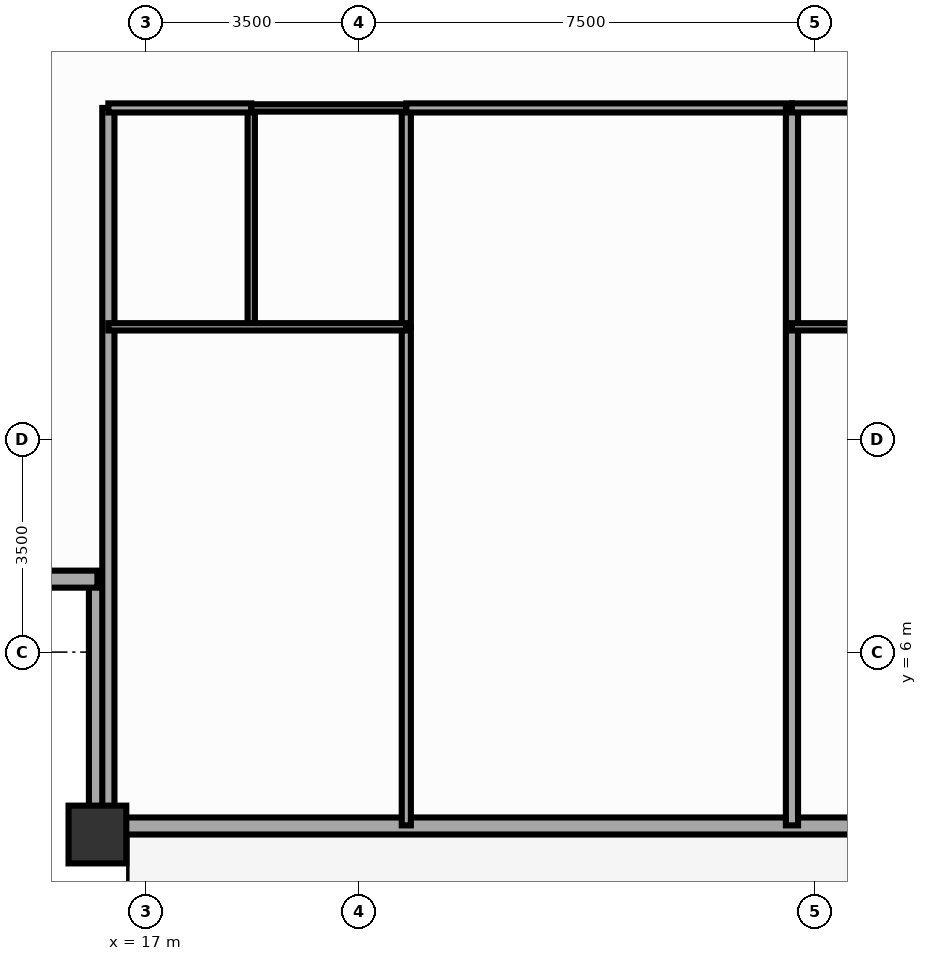
"""IFC4 building model, lengths in metres.
Left out: names, types, materials, properties, quantities, classifications, styles, units other than length and angle.
Written with IfcOpenShell. Run it as: python <this file> out.ifc"""

import sys

from ifc_helpers import new_model, si_unit, direction, frame, frame_2d, origin, origin_2d, place, context, subcontext, project, spatial, rectangle, extrude, source, transform, mapped, element, fill, save


model = new_model("IFC4")
c1 = context("Model", 3, precision=1e-05, world=origin(), true_north=direction((0.0, 1.0)))
c2 = subcontext(c1, "Body", "Model", "MODEL_VIEW")
j1 = project(units=[si_unit("LENGTHUNIT", "METRE"), si_unit("PLANEANGLEUNIT", "RADIAN")], contexts=[c1])
p1 = place(None, origin())
s1 = spatial("IfcSite", under=j1, at=p1, CompositionType="ELEMENT")
p2 = place(p1, origin())
s2 = spatial("IfcBuilding", under=s1, at=p2, CompositionType="ELEMENT")
p3 = place(p2, frame((0.0, 0.0, 74.35)))
s3 = spatial("IfcBuildingStorey", under=s2, at=p3, CompositionType="ELEMENT", Elevation=74.35)
m1 = source(origin(), c2, "Body", "SweptSolid", [
    extrude(rectangle(XDim=0.95, YDim=0.95, at=origin_2d()), origin(), (0.0, 0.0, 1.0), 3.5),
])
p4 = place(p3, frame((16.2, 3.0, 0.0), z_axis=(0.0, 0.0, 1.0), x_axis=(1.0, 0.0, 0.0)))
e1 = element("IfcColumn", 1, at=p4, inside=s3, PredefinedType="COLUMN", context=c2, shape_type="MappedRepresentation", body=[
    mapped(m1, transform((0.0, 0.0, 0.0), scale=1.0)),
])
p5 = place(p3, frame((16.2, 3.14, 0.0), z_axis=(0.0, 0.0, 1.0), x_axis=(1.0, 0.0, 0.0)))
e2 = element("IfcWall", 2, at=p5, inside=s3, PredefinedType="SOLIDWALL", context=c2, shape_type="SweptSolid", body=[
    extrude(rectangle(XDim=43.6, YDim=0.28, at=frame_2d((21.8, 0.0))), origin(), (0.0, 0.0, 1.0), 2.78),
])
p6 = place(p5, frame((1.798, 0.0, 0.85)))
e3 = element("IfcOpeningElement", 3, at=p6, cuts=e2, PredefinedType="OPENING", context=c2, shape_type="SweptSolid", body=[
    extrude(rectangle(XDim=1.8, YDim=1.65, at=frame_2d((0.9, 0.825))), frame((0.0, 0.152, 0.0), z_axis=(0.0, -1.0, 0.0), x_axis=(1.0, 0.0, 0.0)), (0.0, 0.0, 1.0), 0.304),
])
p7 = place(p5, frame((7.351, 0.0, 0.85)))
e4 = element("IfcOpeningElement", 4, at=p7, cuts=e2, PredefinedType="OPENING", context=c2, shape_type="SweptSolid", body=[
    extrude(rectangle(XDim=1.8, YDim=1.65, at=frame_2d((0.9, 0.825))), frame((0.0, 0.152, 0.0), z_axis=(0.0, -1.0, 0.0), x_axis=(1.0, 0.0, 0.0)), (0.0, 0.0, 1.0), 0.304),
])
p8 = place(p5, frame((12.304, 0.0, 0.85)))
e5 = element("IfcOpeningElement", 5, at=p8, cuts=e2, PredefinedType="OPENING", context=c2, shape_type="SweptSolid", body=[
    extrude(rectangle(XDim=1.8, YDim=1.65, at=frame_2d((0.9, 0.825))), frame((0.0, 0.152, 0.0), z_axis=(0.0, -1.0, 0.0), x_axis=(1.0, 0.0, 0.0)), (0.0, 0.0, 1.0), 0.304),
])
p9 = place(p5, frame((20.044, 0.0, 0.0), z_axis=(0.0, 0.0, 1.0), x_axis=(-1.0, 0.0, 0.0)))
e6 = element("IfcOpeningElement", 6, at=p9, cuts=e2, PredefinedType="OPENING", context=c2, shape_type="SweptSolid", body=[
    extrude(rectangle(XDim=1.1, YDim=2.15, at=frame_2d((0.55, 1.075))), frame((0.0, 0.152, 0.0), z_axis=(0.0, -1.0, 0.0), x_axis=(1.0, 0.0, 0.0)), (0.0, 0.0, 1.0), 0.304),
])
p10 = place(p5, frame((24.215, 0.0, 0.85)))
e7 = element("IfcOpeningElement", 7, at=p10, cuts=e2, PredefinedType="OPENING", context=c2, shape_type="SweptSolid", body=[
    extrude(rectangle(XDim=1.8, YDim=1.65, at=frame_2d((0.9, 0.825))), frame((0.0, 0.152, 0.0), z_axis=(0.0, -1.0, 0.0), x_axis=(1.0, 0.0, 0.0)), (0.0, 0.0, 1.0), 0.304),
])
p11 = place(p5, frame((29.929, 0.0, 0.85)))
e8 = element("IfcOpeningElement", 8, at=p11, cuts=e2, PredefinedType="OPENING", context=c2, shape_type="SweptSolid", body=[
    extrude(rectangle(XDim=1.8, YDim=1.65, at=frame_2d((0.9, 0.825))), frame((0.0, 0.152, 0.0), z_axis=(0.0, -1.0, 0.0), x_axis=(1.0, 0.0, 0.0)), (0.0, 0.0, 1.0), 0.304),
])
p12 = place(p5, frame((34.592, 0.0, 0.85)))
e9 = element("IfcOpeningElement", 9, at=p12, cuts=e2, PredefinedType="OPENING", context=c2, shape_type="SweptSolid", body=[
    extrude(rectangle(XDim=1.8, YDim=1.65, at=frame_2d((0.9, 0.825))), frame((0.0, 0.152, 0.0), z_axis=(0.0, -1.0, 0.0), x_axis=(1.0, 0.0, 0.0)), (0.0, 0.0, 1.0), 0.304),
])
p13 = place(p5, frame((39.714, 0.0, 0.85)))
e10 = element("IfcOpeningElement", 10, at=p13, cuts=e2, PredefinedType="OPENING", context=c2, shape_type="SweptSolid", body=[
    extrude(rectangle(XDim=1.8, YDim=1.65, at=frame_2d((0.9, 0.825))), frame((0.0, 0.152, 0.0), z_axis=(0.0, -1.0, 0.0), x_axis=(1.0, 0.0, 0.0)), (0.0, 0.0, 1.0), 0.304),
])
for number, where, z_axis, x_axis in (
    (11, (16.2, 3.08, 0.0), (0.0, 0.0, 1.0), (0.0, 1.0, 0.0)),
    (12, (12.08, 7.2, 0.0), (0.0, 0.0, 1.0), (1.0, 0.0, 0.0)),
):
    element("IfcWall", number, at=place(p3, frame(where, z_axis=z_axis, x_axis=x_axis)), inside=s3, PredefinedType="SOLIDWALL", context=c2, shape_type="SweptSolid", body=[
        extrude(rectangle(XDim=4.12, YDim=0.28, at=frame_2d((2.06, 0.0))), origin(), (0.0, 0.0, 1.0), 2.78),
    ])
p14 = place(p3, frame((16.38, 14.95, 0.0), z_axis=(0.0, 0.0, 1.0), x_axis=(0.0, -1.0, 0.0)))
e13 = element("IfcWall", 13, at=p14, inside=s3, PredefinedType="PARTITIONING", context=c2, shape_type="SweptSolid", body=[
    extrude(rectangle(XDim=11.8, YDim=0.2, at=frame_2d((5.9, 0.0))), origin(), (0.0, 0.0, 1.0), 3.29),
])
p15 = place(p3, frame((18.73, 14.95, 0.0), z_axis=(0.0, 0.0, 1.0), x_axis=(0.0, -1.0, 0.0)))
e14 = element("IfcWall", 14, at=p15, inside=s3, PredefinedType="PARTITIONING", context=c2, shape_type="SweptSolid", body=[
    extrude(rectangle(XDim=3.6, YDim=0.12, at=frame_2d((1.8, 0.0))), origin(), (0.0, 0.0, 1.0), 3.29),
])
p16 = place(p3, frame((21.28, 14.95, 0.0), z_axis=(0.0, 0.0, 1.0), x_axis=(0.0, -1.0, 0.0)))
e15 = element("IfcWall", 15, at=p16, inside=s3, PredefinedType="PARTITIONING", context=c2, shape_type="SweptSolid", body=[
    extrude(rectangle(XDim=3.6, YDim=0.15, at=frame_2d((1.8, 0.0))), origin(), (0.0, 0.0, 1.0), 3.29),
])
p17 = place(p3, frame((21.28, 11.35, 0.0), z_axis=(0.0, 0.0, 1.0), x_axis=(0.0, -1.0, 0.0)))
e16 = element("IfcWall", 16, at=p17, inside=s3, PredefinedType="PARTITIONING", context=c2, shape_type="SweptSolid", body=[
    extrude(rectangle(XDim=8.2, YDim=0.15, at=frame_2d((4.1, 0.0))), origin(), (0.0, 0.0, 1.0), 3.29),
])
p18 = place(p17, frame((3.65, 0.0, 0.0)))
e17 = element("IfcOpeningElement", 17, at=p18, cuts=e16, PredefinedType="OPENING", context=c2, shape_type="SweptSolid", body=[
    extrude(rectangle(XDim=0.9, YDim=2.1, at=frame_2d((0.45, 1.05))), frame((0.0, 0.087, 0.0), z_axis=(0.0, -1.0, 0.0), x_axis=(1.0, 0.0, 0.0)), (0.0, 0.0, 1.0), 0.174),
])
p19 = place(p3, frame((16.38, 11.35, 0.0), z_axis=(0.0, 0.0, 1.0), x_axis=(1.0, 0.0, 0.0)))
e18 = element("IfcWall", 18, at=p19, inside=s3, PredefinedType="PARTITIONING", context=c2, shape_type="SweptSolid", body=[
    extrude(rectangle(XDim=4.9, YDim=0.12, at=frame_2d((2.45, 0.0))), origin(), (0.0, 0.0, 1.0), 3.29),
])
p20 = place(p3, frame((16.38, 14.95, 0.0), z_axis=(0.0, 0.0, 1.0), x_axis=(1.0, 0.0, 0.0)))
e19 = element("IfcWall", 19, at=p20, inside=s3, PredefinedType="PARTITIONING", context=c2, shape_type="SweptSolid", body=[
    extrude(rectangle(XDim=2.35, YDim=0.15, at=frame_2d((1.175, 0.0))), origin(), (0.0, 0.0, 1.0), 3.29),
])
p21 = place(p20, frame((0.725, 0.0, 0.0)))
e20 = element("IfcOpeningElement", 20, at=p21, cuts=e19, PredefinedType="OPENING", context=c2, shape_type="SweptSolid", body=[
    extrude(rectangle(XDim=0.9, YDim=2.1, at=frame_2d((0.45, 1.05))), frame((0.0, 0.087, 0.0), z_axis=(0.0, -1.0, 0.0), x_axis=(1.0, 0.0, 0.0)), (0.0, 0.0, 1.0), 0.174),
])
p22 = place(p3, frame((18.73, 14.95, 0.0), z_axis=(0.0, 0.0, 1.0), x_axis=(1.0, 0.0, 0.0)))
e21 = element("IfcWall", 21, at=p22, inside=s3, PredefinedType="PARTITIONING", context=c2, shape_type="SweptSolid", body=[
    extrude(rectangle(XDim=2.55, YDim=0.12, at=frame_2d((1.275, 0.0))), origin(), (0.0, 0.0, 1.0), 3.29),
])
p23 = place(p22, frame((0.775, 0.0, 0.0)))
e22 = element("IfcOpeningElement", 22, at=p23, cuts=e21, PredefinedType="OPENING", context=c2, shape_type="SweptSolid", body=[
    extrude(rectangle(XDim=1.0, YDim=2.1, at=frame_2d((0.5, 1.05))), frame((0.0, 0.072, 0.0), z_axis=(0.0, -1.0, 0.0), x_axis=(1.0, 0.0, 0.0)), (0.0, 0.0, 1.0), 0.144),
])
p24 = place(p3, frame((21.28, 14.95, 0.0), z_axis=(0.0, 0.0, 1.0), x_axis=(1.0, 0.0, 0.0)))
e23 = element("IfcWall", 23, at=p24, inside=s3, PredefinedType="PARTITIONING", context=c2, shape_type="SweptSolid", body=[
    extrude(rectangle(XDim=6.342, YDim=0.15, at=frame_2d((3.171, 0.0))), origin(), (0.0, 0.0, 1.0), 3.29),
])
p25 = place(p24, frame((2.424, 0.0, 0.0)))
e24 = element("IfcOpeningElement", 24, at=p25, cuts=e23, PredefinedType="OPENING", context=c2, shape_type="SweptSolid", body=[
    extrude(rectangle(XDim=1.1, YDim=2.15, at=frame_2d((0.55, 1.075))), frame((0.0, 0.087, 0.0), z_axis=(0.0, -1.0, 0.0), x_axis=(1.0, 0.0, 0.0)), (0.0, 0.0, 1.0), 0.174),
])
p26 = place(p3, frame((27.622, 14.95, 0.0), z_axis=(0.0, 0.0, 1.0), x_axis=(0.0, -1.0, 0.0)))
e25 = element("IfcWall", 25, at=p26, inside=s3, PredefinedType="PARTITIONING", context=c2, shape_type="SweptSolid", body=[
    extrude(rectangle(XDim=11.8, YDim=0.2, at=frame_2d((5.9, 0.0))), origin(), (0.0, 0.0, 1.0), 3.29),
])
p27 = place(p3, frame((27.622, 11.35, 0.0), z_axis=(0.0, 0.0, 1.0), x_axis=(1.0, 0.0, 0.0)))
e26 = element("IfcWall", 26, at=p27, inside=s3, PredefinedType="PARTITIONING", context=c2, shape_type="SweptSolid", body=[
    extrude(rectangle(XDim=4.9, YDim=0.12, at=frame_2d((2.45, 0.0))), origin(), (0.0, 0.0, 1.0), 3.29),
])
p28 = place(p3, frame((27.622, 14.95, 0.0), z_axis=(0.0, 0.0, 1.0), x_axis=(1.0, 0.0, 0.0)))
e27 = element("IfcWall", 27, at=p28, inside=s3, PredefinedType="PARTITIONING", context=c2, shape_type="SweptSolid", body=[
    extrude(rectangle(XDim=2.35, YDim=0.15, at=frame_2d((1.175, 0.0))), origin(), (0.0, 0.0, 1.0), 3.29),
])
p29 = place(p28, frame((0.725, 0.0, 0.0)))
e28 = element("IfcOpeningElement", 28, at=p29, cuts=e27, PredefinedType="OPENING", context=c2, shape_type="SweptSolid", body=[
    extrude(rectangle(XDim=0.9, YDim=2.1, at=frame_2d((0.45, 1.05))), frame((0.0, 0.087, 0.0), z_axis=(0.0, -1.0, 0.0), x_axis=(1.0, 0.0, 0.0)), (0.0, 0.0, 1.0), 0.174),
])
m2 = source(origin(), c2, "Body", "SweptSolid", [
    extrude(rectangle(XDim=1.8, YDim=1.65, at=frame_2d((0.9, 0.825))), frame((0.0, 0.03, 0.0), z_axis=(0.0, -1.0, 0.0), x_axis=(1.0, 0.0, 0.0)), (0.0, 0.0, 1.0), 0.06),
])
p30 = place(p6, origin())
e29 = element("IfcWindow", 29, at=p30, inside=s3, PartitioningType="SINGLE_PANEL", PredefinedType="WINDOW", context=c2, shape_type="MappedRepresentation", body=[
    mapped(m2, transform((0.0, 0.0, 0.0), scale=1.0)),
])
fill(e3, e29)
p31 = place(p7, origin())
e30 = element("IfcWindow", 30, at=p31, inside=s3, PartitioningType="SINGLE_PANEL", PredefinedType="WINDOW", context=c2, shape_type="MappedRepresentation", body=[
    mapped(m2, transform((0.0, 0.0, 0.0), scale=1.0)),
])
fill(e4, e30)
p32 = place(p8, origin())
e31 = element("IfcWindow", 31, at=p32, inside=s3, PartitioningType="SINGLE_PANEL", PredefinedType="WINDOW", context=c2, shape_type="MappedRepresentation", body=[
    mapped(m2, transform((0.0, 0.0, 0.0), scale=1.0)),
])
fill(e5, e31)
m3 = source(origin(), c2, "Body", "SweptSolid", [
    extrude(rectangle(XDim=0.9, YDim=2.1, at=frame_2d((0.45, 1.05))), frame((0.0, 0.025, 0.0), z_axis=(0.0, -1.0, 0.0), x_axis=(1.0, 0.0, 0.0)), (0.0, 0.0, 1.0), 0.05),
])
p33 = place(p18, origin())
e32 = element("IfcDoor", 32, at=p33, inside=s3, OperationType="SINGLE_SWING_RIGHT", PredefinedType="DOOR", context=c2, shape_type="MappedRepresentation", body=[
    mapped(m3, transform((0.0, 0.0, 0.0), scale=1.0)),
])
fill(e17, e32)
p34 = place(p21, origin())
e33 = element("IfcDoor", 33, at=p34, inside=s3, OperationType="SINGLE_SWING_LEFT", PredefinedType="DOOR", context=c2, shape_type="MappedRepresentation", body=[
    mapped(m3, transform((0.0, 0.0, 0.0), scale=1.0)),
])
fill(e20, e33)
m4 = source(origin(), c2, "Body", "SweptSolid", [
    extrude(rectangle(XDim=1.0, YDim=2.1, at=frame_2d((0.5, 1.05))), frame((0.0, 0.025, 0.0), z_axis=(0.0, -1.0, 0.0), x_axis=(1.0, 0.0, 0.0)), (0.0, 0.0, 1.0), 0.05),
])
p35 = place(p23, origin())
e34 = element("IfcDoor", 34, at=p35, inside=s3, OperationType="SINGLE_SWING_RIGHT", PredefinedType="DOOR", context=c2, shape_type="MappedRepresentation", body=[
    mapped(m4, transform((0.0, 0.0, 0.0), scale=1.0)),
])
fill(e22, e34)
m5 = source(origin(), c2, "Body", "SweptSolid", [
    extrude(rectangle(XDim=1.1, YDim=2.15, at=frame_2d((0.55, 1.075))), frame((0.0, 0.025, 0.0), z_axis=(0.0, -1.0, 0.0), x_axis=(1.0, 0.0, 0.0)), (0.0, 0.0, 1.0), 0.05),
])
p36 = place(p25, origin())
e35 = element("IfcDoor", 35, at=p36, inside=s3, OperationType="SINGLE_SWING_LEFT", PredefinedType="DOOR", context=c2, shape_type="MappedRepresentation", body=[
    mapped(m5, transform((0.0, 0.0, 0.0), scale=1.0)),
])
fill(e24, e35)
p37 = place(p29, origin())
e36 = element("IfcDoor", 36, at=p37, inside=s3, OperationType="SINGLE_SWING_LEFT", PredefinedType="DOOR", context=c2, shape_type="MappedRepresentation", body=[
    mapped(m3, transform((0.0, 0.0, 0.0), scale=1.0)),
])
fill(e28, e36)
save(model, sys.argv[1])
